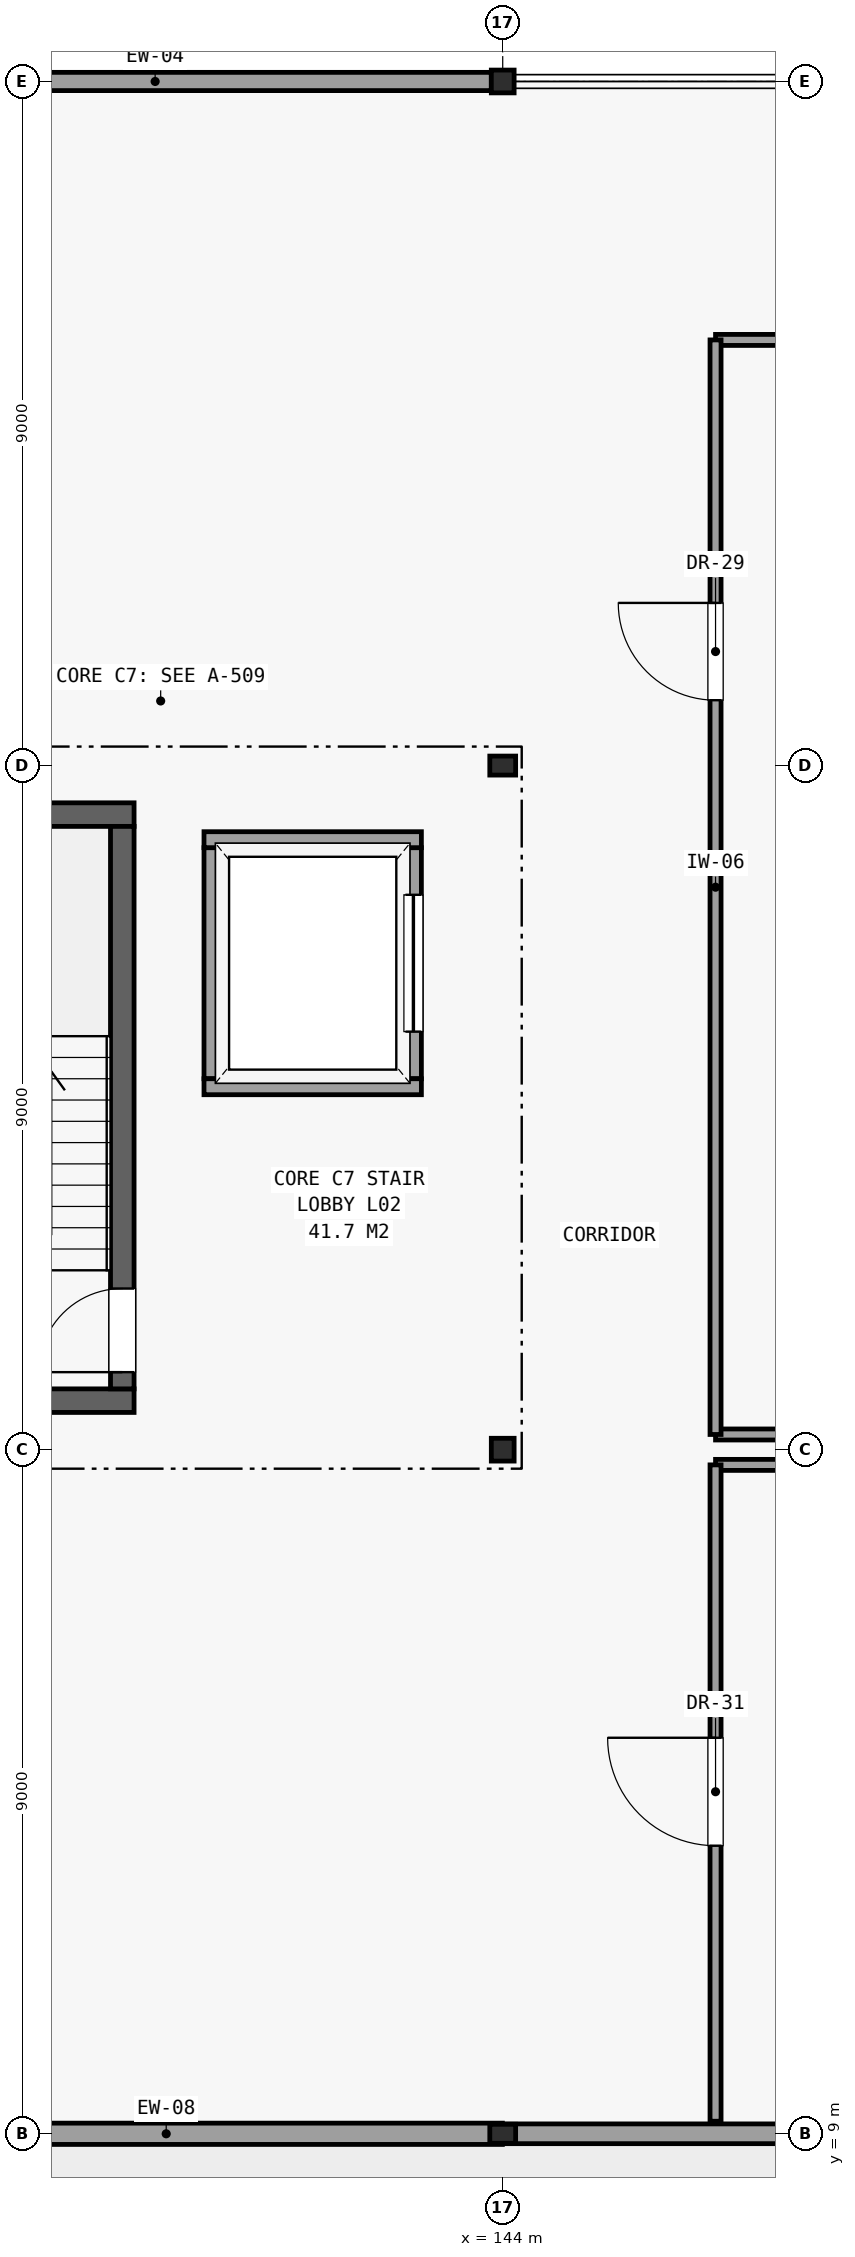
"""IFC4 building model, lengths in metres.
Left out: names, types, materials, properties, quantities, classifications, styles, units other than length and angle.
Written with IfcOpenShell. Run it as: python <this file> out.ifc"""

import sys

from ifc_helpers import new_model, si_unit, direction, frame, frame_2d, origin, origin_2d, place, context, subcontext, project, spatial, rectangle, hollow_rectangle, i_section, extrude, element, fill, save


model = new_model("IFC4")
c1 = context("Model", 3, precision=1e-05, world=origin(), true_north=direction((0.0, 1.0)))
c2 = subcontext(c1, "Body", "Model", "MODEL_VIEW")
j1 = project(units=[si_unit("LENGTHUNIT", "METRE"), si_unit("PLANEANGLEUNIT", "RADIAN")], contexts=[c1])
p1 = place(None, origin())
s1 = spatial("IfcSite", under=j1, at=p1, CompositionType="ELEMENT")
p2 = place(p1, origin())
s2 = spatial("IfcBuilding", under=s1, at=p2, CompositionType="ELEMENT")
p3 = place(p2, frame((0.0, 0.0, 9.3)))
s3 = spatial("IfcBuildingStorey", under=s2, at=p3, CompositionType="ELEMENT", Elevation=9.3)
p4 = place(p3, frame((144.0, 9.0, 0.0), z_axis=(0.0, 0.0, 1.0), x_axis=(1.0, 0.0, 0.0)))
e1 = element("IfcColumn", 1, at=p4, inside=s3, PredefinedType="COLUMN", context=c2, shape_type="SweptSolid", body=[
    extrude(i_section(OverallWidth=0.25, OverallDepth=0.34, WebThickness=0.009, FlangeThickness=0.014, FilletRadius=0.01, at=origin_2d()), origin(), (0.0, 0.0, 1.0), 4.14),
])
p5 = place(p3, frame((144.0, 18.0, 0.0), z_axis=(0.0, 0.0, 1.0), x_axis=(1.0, 0.0, 0.0)))
e2 = element("IfcColumn", 2, at=p5, inside=s3, PredefinedType="COLUMN", context=c2, shape_type="SweptSolid", body=[
    extrude(hollow_rectangle(XDim=0.3, YDim=0.3, WallThickness=0.012, at=origin_2d()), origin(), (0.0, 0.0, 1.0), 4.2),
])
p6 = place(p3, frame((144.0, 27.0, 0.0), z_axis=(0.0, 0.0, 1.0), x_axis=(1.0, 0.0, 0.0)))
e3 = element("IfcColumn", 3, at=p6, inside=s3, PredefinedType="COLUMN", context=c2, shape_type="SweptSolid", body=[
    extrude(i_section(OverallWidth=0.25, OverallDepth=0.34, WebThickness=0.009, FlangeThickness=0.014, FilletRadius=0.01, at=origin_2d()), origin(), (0.0, 0.0, 1.0), 4.2),
])
p7 = place(p3, frame((144.0, 36.0, 0.0), z_axis=(0.0, 0.0, 1.0), x_axis=(1.0, 0.0, 0.0)))
e4 = element("IfcColumn", 4, at=p7, inside=s3, PredefinedType="COLUMN", context=c2, shape_type="SweptSolid", body=[
    extrude(hollow_rectangle(XDim=0.3, YDim=0.3, WallThickness=0.012, at=origin_2d()), origin(), (0.0, 0.0, 1.0), 4.2),
])
p8 = place(p3, frame((135.15, 9.0, 0.0), z_axis=(0.0, 0.0, 1.0), x_axis=(1.0, 0.0, 0.0)))
e5 = element("IfcWall", 5, at=p8, inside=s3, PredefinedType="SOLIDWALL", context=c2, shape_type="SweptSolid", body=[
    extrude(rectangle(XDim=8.846, YDim=0.28, at=frame_2d((4.423, 0.0))), origin(), (0.0, 0.0, 1.0), 3.29),
])
p9 = place(p3, frame((144.004, 9.0, 0.0), z_axis=(0.0, 0.0, 1.0), x_axis=(1.0, 0.0, 0.0)))
e6 = element("IfcWall", 6, at=p9, inside=s3, PredefinedType="SOLIDWALL", context=c2, shape_type="SweptSolid", body=[
    extrude(rectangle(XDim=8.846, YDim=0.26, at=frame_2d((4.423, 0.0))), origin(), (0.0, 0.0, 1.0), 3.29),
])
p10 = place(p3, frame((143.85, 36.0, 0.0), z_axis=(0.0, 0.0, 1.0), x_axis=(-1.0, 0.0, 0.0)))
e7 = element("IfcWall", 7, at=p10, inside=s3, PredefinedType="SOLIDWALL", context=c2, shape_type="SweptSolid", body=[
    extrude(rectangle(XDim=8.846, YDim=0.24, at=frame_2d((4.423, 0.0))), origin(), (0.0, 0.0, 1.0), 3.3),
])
for number, where, z_axis, x_axis in (
    (8, (135.25, 18.645, 0.0), (0.0, 0.0, 1.0), (1.0, 0.0, 0.0)),
    (9, (135.25, 26.355, 0.0), (0.0, 0.0, 1.0), (1.0, 0.0, 0.0)),
):
    element("IfcWall", number, at=place(p3, frame(where, z_axis=z_axis, x_axis=x_axis)), inside=s3, PredefinedType="SHEAR", context=c2, shape_type="SweptSolid", body=[
        extrude(rectangle(XDim=3.9, YDim=0.31, at=frame_2d((1.95, 0.0))), origin(), (0.0, 0.0, 1.0), 3.95),
    ])
p11 = place(p3, frame((138.995, 18.8, 0.0), z_axis=(0.0, 0.0, 1.0), x_axis=(0.0, 1.0, 0.0)))
e10 = element("IfcWall", 10, at=p11, inside=s3, PredefinedType="SHEAR", context=c2, shape_type="SweptSolid", body=[
    extrude(rectangle(XDim=7.4, YDim=0.31, at=frame_2d((3.7, 0.0))), origin(), (0.0, 0.0, 1.0), 3.95),
])
p12 = place(p11, frame((0.22, 0.0, 0.0)))
e11 = element("IfcOpeningElement", 11, at=p12, cuts=e10, PredefinedType="OPENING", context=c2, shape_type="SweptSolid", body=[
    extrude(rectangle(XDim=1.1, YDim=2.15, at=frame_2d((0.55, 1.075))), frame((0.0, 0.166, 0.0), z_axis=(0.0, -1.0, 0.0), x_axis=(1.0, 0.0, 0.0)), (0.0, 0.0, 1.0), 0.332),
])
p13 = place(p3, frame((142.825, 22.88, 0.0), z_axis=(0.0, 0.0, 1.0), x_axis=(0.0, 1.0, 0.0)))
e12 = element("IfcWall", 12, at=p13, inside=s3, PredefinedType="PARTITIONING", context=c2, shape_type="SweptSolid", body=[
    extrude(rectangle(XDim=3.04, YDim=0.21, at=frame_2d((1.52, 0.0))), origin(), (0.0, 0.0, 1.0), 3.95),
])
p14 = place(p13, frame((0.62, 0.0, 0.0)))
e13 = element("IfcOpeningElement", 13, at=p14, cuts=e12, PredefinedType="OPENING", context=c2, shape_type="SweptSolid", body=[
    extrude(rectangle(XDim=1.8, YDim=2.4, at=frame_2d((0.9, 1.2))), frame((0.0, 0.116, 0.0), z_axis=(0.0, -1.0, 0.0), x_axis=(1.0, 0.0, 0.0)), (0.0, 0.0, 1.0), 0.232),
])
p15 = place(p3, frame((140.175, 22.88, 0.0), z_axis=(0.0, 0.0, 1.0), x_axis=(0.0, 1.0, 0.0)))
e14 = element("IfcWall", 14, at=p15, inside=s3, PredefinedType="PARTITIONING", context=c2, shape_type="SweptSolid", body=[
    extrude(rectangle(XDim=3.04, YDim=0.21, at=frame_2d((1.52, 0.0))), origin(), (0.0, 0.0, 1.0), 3.95),
])
for number, where, z_axis, x_axis in (
    (15, (140.07, 22.775, 0.0), (0.0, 0.0, 1.0), (1.0, 0.0, 0.0)),
    (16, (140.07, 26.025, 0.0), (0.0, 0.0, 1.0), (1.0, 0.0, 0.0)),
):
    element("IfcWall", number, at=place(p3, frame(where, z_axis=z_axis, x_axis=x_axis)), inside=s3, PredefinedType="PARTITIONING", context=c2, shape_type="SweptSolid", body=[
        extrude(rectangle(XDim=2.86, YDim=0.21, at=frame_2d((1.43, 0.0))), origin(), (0.0, 0.0, 1.0), 3.95),
    ])
p16 = place(p3, frame((146.8, 18.2, 0.0), z_axis=(0.0, 0.0, 1.0), x_axis=(1.0, 0.0, 0.0)))
e17 = element("IfcWall", 17, at=p16, inside=s3, PredefinedType="PARTITIONING", context=c2, shape_type="SweptSolid", body=[
    extrude(rectangle(XDim=6.075, YDim=0.145, at=frame_2d((3.038, 0.0))), origin(), (0.0, 0.0, 1.0), 3.29),
])
p17 = place(p3, frame((146.8, 32.6, 0.0), z_axis=(0.0, 0.0, 1.0), x_axis=(1.0, 0.0, 0.0)))
e18 = element("IfcWall", 18, at=p17, inside=s3, PredefinedType="PARTITIONING", context=c2, shape_type="SweptSolid", body=[
    extrude(rectangle(XDim=14.8, YDim=0.145, at=frame_2d((7.4, 0.0))), origin(), (0.0, 0.0, 1.0), 3.3),
])
p18 = place(p3, frame((146.8, 18.2, 0.0), z_axis=(0.0, 0.0, 1.0), x_axis=(0.0, 1.0, 0.0)))
e19 = element("IfcWall", 19, at=p18, inside=s3, PredefinedType="PARTITIONING", context=c2, shape_type="SweptSolid", body=[
    extrude(rectangle(XDim=14.4, YDim=0.145, at=frame_2d((7.2, 0.0))), origin(), (0.0, 0.0, 1.0), 3.34),
])
p19 = place(p18, frame((9.66, 0.0, 0.0)))
e20 = element("IfcOpeningElement", 20, at=p19, cuts=e19, PredefinedType="OPENING", context=c2, shape_type="SweptSolid", body=[
    extrude(rectangle(XDim=1.28, YDim=2.3, at=frame_2d((0.64, 1.15))), frame((0.0, 0.083, 0.0), z_axis=(0.0, -1.0, 0.0), x_axis=(1.0, 0.0, 0.0)), (0.0, 0.0, 1.0), 0.167),
])
p20 = place(p3, frame((146.8, 17.8, 0.0), z_axis=(0.0, 0.0, 1.0), x_axis=(1.0, 0.0, 0.0)))
e21 = element("IfcWall", 21, at=p20, inside=s3, PredefinedType="PARTITIONING", context=c2, shape_type="SweptSolid", body=[
    extrude(rectangle(XDim=6.075, YDim=0.145, at=frame_2d((3.038, 0.0))), origin(), (0.0, 0.0, 1.0), 3.29),
])
p21 = place(p3, frame((146.8, 9.165, 0.0), z_axis=(0.0, 0.0, 1.0), x_axis=(0.0, 1.0, 0.0)))
e22 = element("IfcWall", 22, at=p21, inside=s3, PredefinedType="PARTITIONING", context=c2, shape_type="SweptSolid", body=[
    extrude(rectangle(XDim=8.635, YDim=0.145, at=frame_2d((4.317, 0.0))), origin(), (0.0, 0.0, 1.0), 3.34),
])
p22 = place(p21, frame((3.625, 0.0, 0.0)))
e23 = element("IfcOpeningElement", 23, at=p22, cuts=e22, PredefinedType="OPENING", context=c2, shape_type="SweptSolid", body=[
    extrude(rectangle(XDim=1.42, YDim=2.3, at=frame_2d((0.71, 1.15))), frame((0.0, 0.083, 0.0), z_axis=(0.0, -1.0, 0.0), x_axis=(1.0, 0.0, 0.0)), (0.0, 0.0, 1.0), 0.167),
])
p23 = place(p12, origin())
e24 = element("IfcDoor", 24, at=p23, inside=s3, OperationType="SINGLE_SWING_LEFT", PredefinedType="DOOR", context=c2, shape_type="SweptSolid", body=[
    extrude(rectangle(XDim=1.1, YDim=2.15, at=frame_2d((0.55, 1.075))), frame((0.0, 0.025, 0.0), z_axis=(0.0, -1.0, 0.0), x_axis=(1.0, 0.0, 0.0)), (0.0, 0.0, 1.0), 0.05),
])
fill(e11, e24)
p24 = place(p14, origin())
e25 = element("IfcDoor", 25, at=p24, inside=s3, OperationType="SLIDING_TO_LEFT", PredefinedType="DOOR", context=c2, shape_type="SweptSolid", body=[
    extrude(rectangle(XDim=1.8, YDim=2.4, at=frame_2d((0.9, 1.2))), frame((0.0, 0.025, 0.0), z_axis=(0.0, -1.0, 0.0), x_axis=(1.0, 0.0, 0.0)), (0.0, 0.0, 1.0), 0.05),
])
fill(e13, e25)
p25 = place(p19, origin())
e26 = element("IfcDoor", 26, at=p25, inside=s3, OperationType="SINGLE_SWING_RIGHT", PredefinedType="DOOR", context=c2, shape_type="SweptSolid", body=[
    extrude(rectangle(XDim=1.28, YDim=2.3, at=frame_2d((0.64, 1.15))), frame((0.0, 0.025, 0.0), z_axis=(0.0, -1.0, 0.0), x_axis=(1.0, 0.0, 0.0)), (0.0, 0.0, 1.0), 0.05),
])
fill(e20, e26)
p26 = place(p22, origin())
e27 = element("IfcDoor", 27, at=p26, inside=s3, OperationType="SINGLE_SWING_RIGHT", PredefinedType="DOOR", context=c2, shape_type="SweptSolid", body=[
    extrude(rectangle(XDim=1.42, YDim=2.3, at=frame_2d((0.71, 1.15))), frame((0.0, 0.025, 0.0), z_axis=(0.0, -1.0, 0.0), x_axis=(1.0, 0.0, 0.0)), (0.0, 0.0, 1.0), 0.05),
])
fill(e23, e27)
save(model, sys.argv[1])
